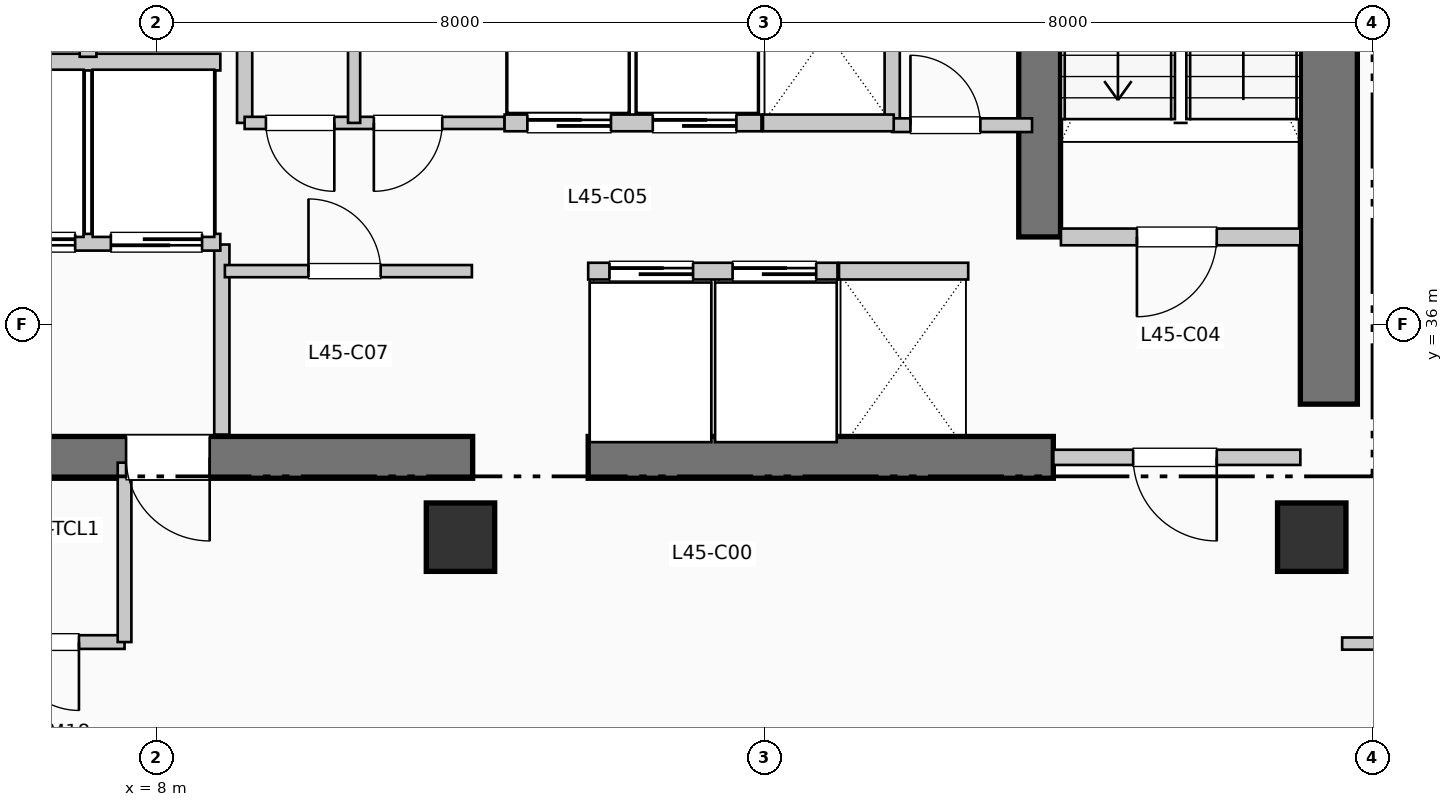
"""IFC4 building model, lengths in metres.
Left out: names, types, materials, properties, quantities, classifications, styles, units other than length and angle.
Written with IfcOpenShell. Run it as: python <this file> out.ifc"""

import sys

from ifc_helpers import new_model, si_unit, direction, frame, frame_2d, origin, origin_2d, place, context, subcontext, project, spatial, rectangle, extrude, element, fill, save


model = new_model("IFC4")
c1 = context("Model", 3, precision=1e-05, world=origin(), true_north=direction((0.0, 1.0)))
c2 = subcontext(c1, "Body", "Model", "MODEL_VIEW")
j1 = project(units=[si_unit("LENGTHUNIT", "METRE"), si_unit("PLANEANGLEUNIT", "RADIAN")], contexts=[c1])
p1 = place(None, origin())
s1 = spatial("IfcSite", under=j1, at=p1, CompositionType="ELEMENT")
p2 = place(p1, origin())
s2 = spatial("IfcBuilding", under=s1, at=p2, CompositionType="ELEMENT")
p3 = place(p2, frame((0.0, 0.0, 187.44)))
s3 = spatial("IfcBuildingStorey", under=s2, at=p3, CompositionType="ELEMENT", Elevation=187.44)
p4 = place(p3, frame((23.425, 34.95, 0.0), z_axis=(0.0, 0.0, 1.0), x_axis=(0.0, 1.0, 0.0)))
e1 = element("IfcWall", 1, at=p4, inside=s3, PredefinedType="SHEAR", context=c2, shape_type="SweptSolid", body=[
    extrude(rectangle(XDim=10.64, YDim=0.75, at=frame_2d((5.32, 0.0))), origin(), (0.0, 0.0, 1.0), 3.96),
])
p5 = place(p3, frame((1.45, 34.25, 0.0), z_axis=(0.0, 0.0, 1.0), x_axis=(1.0, 0.0, 0.0)))
e2 = element("IfcWall", 2, at=p5, inside=s3, PredefinedType="SHEAR", context=c2, shape_type="SweptSolid", body=[
    extrude(rectangle(XDim=10.71, YDim=0.55, at=frame_2d((5.355, 0.0))), origin(), (0.0, 0.0, 1.0), 3.96),
])
p6 = place(p5, frame((7.25, 0.0, 0.0), z_axis=(0.0, 0.0, 1.0), x_axis=(-1.0, 0.0, 0.0)))
e3 = element("IfcOpeningElement", 3, at=p6, cuts=e2, PredefinedType="OPENING", context=c2, shape_type="SweptSolid", body=[
    extrude(rectangle(XDim=1.1, YDim=2.15, at=frame_2d((0.55, 1.075))), frame((0.0, 0.285, 0.0), z_axis=(0.0, -1.0, 0.0), x_axis=(1.0, 0.0, 0.0)), (0.0, 0.0, 1.0), 0.57),
])
p7 = place(p3, frame((13.68, 34.25, 0.0), z_axis=(0.0, 0.0, 1.0), x_axis=(1.0, 0.0, 0.0)))
e4 = element("IfcWall", 4, at=p7, inside=s3, PredefinedType="SHEAR", context=c2, shape_type="SweptSolid", body=[
    extrude(rectangle(XDim=6.12, YDim=0.55, at=frame_2d((3.06, 0.0))), origin(), (0.0, 0.0, 1.0), 3.96),
])
p8 = place(p3, frame((19.62, 37.15, 0.0), z_axis=(0.0, 0.0, 1.0), x_axis=(0.0, 1.0, 0.0)))
e5 = element("IfcWall", 5, at=p8, inside=s3, PredefinedType="SHEAR", context=c2, shape_type="SweptSolid", body=[
    extrude(rectangle(XDim=7.89, YDim=0.55, at=frame_2d((3.945, 0.0))), origin(), (0.0, 0.0, 1.0), 3.96),
])
for number, where, z_axis, x_axis in (
    (6, (12.0, 33.2, 0.0), (0.0, 0.0, 1.0), (1.0, 0.0, 0.0)),
    (7, (23.2, 33.2, 0.0), (0.0, 0.0, 1.0), (1.0, 0.0, 0.0)),
):
    element("IfcColumn", number, at=place(p3, frame(where, z_axis=z_axis, x_axis=x_axis)), inside=s3, PredefinedType="COLUMN", context=c2, shape_type="SweptSolid", body=[
        extrude(rectangle(XDim=0.9, YDim=0.9, at=origin_2d()), origin(), (0.0, 0.0, 1.0), 3.96),
    ])
p9 = place(p3, frame((8.86, 34.55, 0.0), z_axis=(0.0, 0.0, 1.0), x_axis=(0.0, 1.0, 0.0)))
e8 = element("IfcWall", 8, at=p9, inside=s3, PredefinedType="PARTITIONING", context=c2, shape_type="SweptSolid", body=[
    extrude(rectangle(XDim=2.5, YDim=0.2, at=frame_2d((1.25, 0.0))), origin(), (0.0, 0.0, 1.0), 3.71),
])
p10 = place(p3, frame((19.9, 37.15, 0.0), z_axis=(0.0, 0.0, 1.0), x_axis=(1.0, 0.0, 0.0)))
e9 = element("IfcWall", 9, at=p10, inside=s3, PredefinedType="PARTITIONING", context=c2, shape_type="SweptSolid", body=[
    extrude(rectangle(XDim=3.15, YDim=0.22, at=frame_2d((1.575, 0.0))), origin(), (0.0, 0.0, 1.0), 3.71),
])
p11 = place(p10, frame((2.05, 0.0, 0.0), z_axis=(0.0, 0.0, 1.0), x_axis=(-1.0, 0.0, 0.0)))
e10 = element("IfcOpeningElement", 10, at=p11, cuts=e9, PredefinedType="OPENING", context=c2, shape_type="SweptSolid", body=[
    extrude(rectangle(XDim=1.05, YDim=2.15, at=frame_2d((0.525, 1.075))), frame((0.0, 0.12, 0.0), z_axis=(0.0, -1.0, 0.0), x_axis=(1.0, 0.0, 0.0)), (0.0, 0.0, 1.0), 0.24),
])
p12 = place(p3, frame((19.8, 34.25, 0.0), z_axis=(0.0, 0.0, 1.0), x_axis=(1.0, 0.0, 0.0)))
e11 = element("IfcWall", 11, at=p12, inside=s3, PredefinedType="PARTITIONING", context=c2, shape_type="SweptSolid", body=[
    extrude(rectangle(XDim=3.25, YDim=0.2, at=frame_2d((1.625, 0.0))), origin(), (0.0, 0.0, 1.0), 3.71),
])
p13 = place(p12, frame((2.15, 0.0, 0.0), z_axis=(0.0, 0.0, 1.0), x_axis=(-1.0, 0.0, 0.0)))
e12 = element("IfcOpeningElement", 12, at=p13, cuts=e11, PredefinedType="OPENING", context=c2, shape_type="SweptSolid", body=[
    extrude(rectangle(XDim=1.1, YDim=2.15, at=frame_2d((0.55, 1.075))), frame((0.0, 0.11, 0.0), z_axis=(0.0, -1.0, 0.0), x_axis=(1.0, 0.0, 0.0)), (0.0, 0.0, 1.0), 0.22),
])
p14 = place(p3, frame((5.38, 37.08, 0.0), z_axis=(0.0, 0.0, 1.0), x_axis=(1.0, 0.0, 0.0)))
e13 = element("IfcWall", 13, at=p14, inside=s3, PredefinedType="PARTITIONING", context=c2, shape_type="SweptSolid", body=[
    extrude(rectangle(XDim=3.46, YDim=0.22, at=frame_2d((1.73, 0.0))), origin(), (0.0, 0.0, 1.0), 3.71),
])
p15 = place(p14, frame((1.55, 0.0, 0.0), z_axis=(0.0, 0.0, 1.0), x_axis=(-1.0, 0.0, 0.0)))
e14 = element("IfcOpeningElement", 14, at=p15, cuts=e13, PredefinedType="OPENING", context=c2, shape_type="SweptSolid", body=[
    extrude(rectangle(XDim=1.2, YDim=2.2, at=frame_2d((0.6, 1.1))), frame((0.0, 0.12, 0.0), z_axis=(0.0, -1.0, 0.0), x_axis=(1.0, 0.0, 0.0)), (0.0, 0.0, 1.0), 0.24),
])
p16 = place(p14, frame((3.22, 0.0, 0.0), z_axis=(0.0, 0.0, 1.0), x_axis=(-1.0, 0.0, 0.0)))
e15 = element("IfcOpeningElement", 15, at=p16, cuts=e13, PredefinedType="OPENING", context=c2, shape_type="SweptSolid", body=[
    extrude(rectangle(XDim=1.2, YDim=2.2, at=frame_2d((0.6, 1.1))), frame((0.0, 0.12, 0.0), z_axis=(0.0, -1.0, 0.0), x_axis=(1.0, 0.0, 0.0)), (0.0, 0.0, 1.0), 0.24),
])
p17 = place(p3, frame((5.38, 39.45, 0.0), z_axis=(0.0, 0.0, 1.0), x_axis=(1.0, 0.0, 0.0)))
e16 = element("IfcWall", 16, at=p17, inside=s3, PredefinedType="PARTITIONING", context=c2, shape_type="SweptSolid", body=[
    extrude(rectangle(XDim=3.46, YDim=0.22, at=frame_2d((1.73, 0.0))), origin(), (0.0, 0.0, 1.0), 3.71),
])
p18 = place(p3, frame((7.1, 39.52, 0.0), z_axis=(0.0, 0.0, 1.0), x_axis=(0.0, 1.0, 0.0)))
e17 = element("IfcWall", 17, at=p18, inside=s3, PredefinedType="PARTITIONING", context=c2, shape_type="SweptSolid", body=[
    extrude(rectangle(XDim=2.93, YDim=0.22, at=frame_2d((1.465, 0.0))), origin(), (0.0, 0.0, 1.0), 3.71),
])
for number, where, z_axis, x_axis in (
    (18, (9.16, 38.65, 0.0), (0.0, 0.0, 1.0), (0.0, 1.0, 0.0)),
    (19, (17.68, 38.65, 0.0), (0.0, 0.0, 1.0), (0.0, 1.0, 0.0)),
):
    element("IfcWall", number, at=place(p3, frame(where, z_axis=z_axis, x_axis=x_axis)), inside=s3, PredefinedType="PARTITIONING", context=c2, shape_type="SweptSolid", body=[
        extrude(rectangle(XDim=2.35, YDim=0.2, at=frame_2d((1.175, 0.0))), origin(), (0.0, 0.0, 1.0), 3.71),
    ])
p19 = place(p3, frame((17.68, 38.62, 0.0), z_axis=(0.0, 0.0, 1.0), x_axis=(1.0, 0.0, 0.0)))
e20 = element("IfcWall", 20, at=p19, inside=s3, PredefinedType="PARTITIONING", context=c2, shape_type="SweptSolid", body=[
    extrude(rectangle(XDim=1.84, YDim=0.18, at=frame_2d((0.92, 0.0))), origin(), (0.0, 0.0, 1.0), 3.71),
])
p20 = place(p19, frame((0.24, 0.0, 0.0)))
e21 = element("IfcOpeningElement", 21, at=p20, cuts=e20, PredefinedType="OPENING", context=c2, shape_type="SweptSolid", body=[
    extrude(rectangle(XDim=0.92, YDim=2.1, at=frame_2d((0.46, 1.05))), frame((0.0, 0.1, 0.0), z_axis=(0.0, -1.0, 0.0), x_axis=(1.0, 0.0, 0.0)), (0.0, 0.0, 1.0), 0.2),
])
p21 = place(p3, frame((5.5, 31.82, 0.0), z_axis=(0.0, 0.0, 1.0), x_axis=(1.0, 0.0, 0.0)))
e22 = element("IfcWall", 22, at=p21, inside=s3, PredefinedType="PLUMBINGWALL", context=c2, shape_type="SweptSolid", body=[
    extrude(rectangle(XDim=2.08, YDim=0.18, at=frame_2d((1.04, 0.0))), origin(), (0.0, 0.0, 1.0), 3.71),
])
p22 = place(p21, frame((1.48, 0.0, 0.0), z_axis=(0.0, 0.0, 1.0), x_axis=(-1.0, 0.0, 0.0)))
e23 = element("IfcOpeningElement", 23, at=p22, cuts=e22, PredefinedType="OPENING", context=c2, shape_type="SweptSolid", body=[
    extrude(rectangle(XDim=0.9, YDim=2.1, at=frame_2d((0.45, 1.05))), frame((0.0, 0.1, 0.0), z_axis=(0.0, -1.0, 0.0), x_axis=(1.0, 0.0, 0.0)), (0.0, 0.0, 1.0), 0.2),
])
p23 = place(p3, frame((7.58, 31.82, 0.0), z_axis=(0.0, 0.0, 1.0), x_axis=(0.0, 1.0, 0.0)))
e24 = element("IfcWall", 24, at=p23, inside=s3, PredefinedType="PLUMBINGWALL", context=c2, shape_type="SweptSolid", body=[
    extrude(rectangle(XDim=2.36, YDim=0.18, at=frame_2d((1.18, 0.0))), origin(), (0.0, 0.0, 1.0), 3.71),
])
p24 = place(p3, frame((8.9, 36.7, 0.0), z_axis=(0.0, 0.0, 1.0), x_axis=(1.0, 0.0, 0.0)))
e25 = element("IfcWall", 25, at=p24, inside=s3, PredefinedType="PARTITIONING", context=c2, shape_type="SweptSolid", body=[
    extrude(rectangle(XDim=3.25, YDim=0.16, at=frame_2d((1.625, 0.0))), origin(), (0.0, 0.0, 1.0), 3.71),
])
p25 = place(p24, frame((1.1, 0.0, 0.0)))
e26 = element("IfcOpeningElement", 26, at=p25, cuts=e25, PredefinedType="OPENING", context=c2, shape_type="SweptSolid", body=[
    extrude(rectangle(XDim=0.95, YDim=2.15, at=frame_2d((0.475, 1.075))), frame((0.0, 0.09, 0.0), z_axis=(0.0, -1.0, 0.0), x_axis=(1.0, 0.0, 0.0)), (0.0, 0.0, 1.0), 0.18),
])
p26 = place(p3, frame((9.16, 38.65, 0.0), z_axis=(0.0, 0.0, 1.0), x_axis=(1.0, 0.0, 0.0)))
e27 = element("IfcWall", 27, at=p26, inside=s3, PredefinedType="PARTITIONING", context=c2, shape_type="SweptSolid", body=[
    extrude(rectangle(XDim=3.42, YDim=0.16, at=frame_2d((1.71, 0.0))), origin(), (0.0, 0.0, 1.0), 3.71),
])
p27 = place(p26, frame((1.18, 0.0, 0.0), z_axis=(0.0, 0.0, 1.0), x_axis=(-1.0, 0.0, 0.0)))
e28 = element("IfcOpeningElement", 28, at=p27, cuts=e27, PredefinedType="OPENING", context=c2, shape_type="SweptSolid", body=[
    extrude(rectangle(XDim=0.9, YDim=2.15, at=frame_2d((0.45, 1.075))), frame((0.0, 0.09, 0.0), z_axis=(0.0, -1.0, 0.0), x_axis=(1.0, 0.0, 0.0)), (0.0, 0.0, 1.0), 0.18),
])
p28 = place(p26, frame((2.6, 0.0, 0.0), z_axis=(0.0, 0.0, 1.0), x_axis=(-1.0, 0.0, 0.0)))
e29 = element("IfcOpeningElement", 29, at=p28, cuts=e27, PredefinedType="OPENING", context=c2, shape_type="SweptSolid", body=[
    extrude(rectangle(XDim=0.9, YDim=2.15, at=frame_2d((0.45, 1.075))), frame((0.0, 0.09, 0.0), z_axis=(0.0, -1.0, 0.0), x_axis=(1.0, 0.0, 0.0)), (0.0, 0.0, 1.0), 0.18),
])
p29 = place(p3, frame((10.6, 38.65, 0.0), z_axis=(0.0, 0.0, 1.0), x_axis=(0.0, 1.0, 0.0)))
e30 = element("IfcWall", 30, at=p29, inside=s3, PredefinedType="PARTITIONING", context=c2, shape_type="SweptSolid", body=[
    extrude(rectangle(XDim=2.35, YDim=0.16, at=frame_2d((1.175, 0.0))), origin(), (0.0, 0.0, 1.0), 3.71),
])
p30 = place(p3, frame((13.68, 36.7, 0.0), z_axis=(0.0, 0.0, 1.0), x_axis=(1.0, 0.0, 0.0)))
e31 = element("IfcWall", 31, at=p30, inside=s3, PredefinedType="PARTITIONING", context=c2, shape_type="SweptSolid", body=[
    extrude(rectangle(XDim=3.28, YDim=0.22, at=frame_2d((1.64, 0.0))), origin(), (0.0, 0.0, 1.0), 3.71),
])
p31 = place(p30, frame((0.28, 0.0, 0.0)))
e32 = element("IfcOpeningElement", 32, at=p31, cuts=e31, PredefinedType="OPENING", context=c2, shape_type="SweptSolid", body=[
    extrude(rectangle(XDim=1.1, YDim=2.2, at=frame_2d((0.55, 1.1))), frame((0.0, 0.12, 0.0), z_axis=(0.0, -1.0, 0.0), x_axis=(1.0, 0.0, 0.0)), (0.0, 0.0, 1.0), 0.24),
])
p32 = place(p30, frame((1.9, 0.0, 0.0)))
e33 = element("IfcOpeningElement", 33, at=p32, cuts=e31, PredefinedType="OPENING", context=c2, shape_type="SweptSolid", body=[
    extrude(rectangle(XDim=1.1, YDim=2.2, at=frame_2d((0.55, 1.1))), frame((0.0, 0.12, 0.0), z_axis=(0.0, -1.0, 0.0), x_axis=(1.0, 0.0, 0.0)), (0.0, 0.0, 1.0), 0.24),
])
p33 = place(p3, frame((12.58, 38.65, 0.0), z_axis=(0.0, 0.0, 1.0), x_axis=(1.0, 0.0, 0.0)))
e34 = element("IfcWall", 34, at=p33, inside=s3, PredefinedType="PARTITIONING", context=c2, shape_type="SweptSolid", body=[
    extrude(rectangle(XDim=3.38, YDim=0.22, at=frame_2d((1.69, 0.0))), origin(), (0.0, 0.0, 1.0), 3.71),
])
p34 = place(p33, frame((0.3, 0.0, 0.0)))
e35 = element("IfcOpeningElement", 35, at=p34, cuts=e34, PredefinedType="OPENING", context=c2, shape_type="SweptSolid", body=[
    extrude(rectangle(XDim=1.1, YDim=2.2, at=frame_2d((0.55, 1.1))), frame((0.0, 0.12, 0.0), z_axis=(0.0, -1.0, 0.0), x_axis=(1.0, 0.0, 0.0)), (0.0, 0.0, 1.0), 0.24),
])
p35 = place(p33, frame((1.95, 0.0, 0.0)))
e36 = element("IfcOpeningElement", 36, at=p35, cuts=e34, PredefinedType="OPENING", context=c2, shape_type="SweptSolid", body=[
    extrude(rectangle(XDim=1.1, YDim=2.2, at=frame_2d((0.55, 1.1))), frame((0.0, 0.12, 0.0), z_axis=(0.0, -1.0, 0.0), x_axis=(1.0, 0.0, 0.0)), (0.0, 0.0, 1.0), 0.24),
])
p36 = place(p3, frame((16.98, 36.7, 0.0), z_axis=(0.0, 0.0, 1.0), x_axis=(1.0, 0.0, 0.0)))
e37 = element("IfcWall", 37, at=p36, inside=s3, PredefinedType="PARTITIONING", context=c2, shape_type="SweptSolid", body=[
    extrude(rectangle(XDim=1.7, YDim=0.22, at=frame_2d((0.85, 0.0))), origin(), (0.0, 0.0, 1.0), 3.71),
])
p37 = place(p3, frame((15.98, 38.65, 0.0), z_axis=(0.0, 0.0, 1.0), x_axis=(1.0, 0.0, 0.0)))
e38 = element("IfcWall", 38, at=p37, inside=s3, PredefinedType="PARTITIONING", context=c2, shape_type="SweptSolid", body=[
    extrude(rectangle(XDim=1.72, YDim=0.22, at=frame_2d((0.86, 0.0))), origin(), (0.0, 0.0, 1.0), 3.71),
])
p38 = place(p3, frame((23.6, 31.8, 0.0), z_axis=(0.0, 0.0, 1.0), x_axis=(1.0, 0.0, 0.0)))
e39 = element("IfcWall", 39, at=p38, inside=s3, PredefinedType="PARTITIONING", context=c2, shape_type="SweptSolid", body=[
    extrude(rectangle(XDim=26.41, YDim=0.16, at=frame_2d((13.205, 0.0))), origin(), (0.0, 0.0, 1.0), 3.71),
])
p39 = place(p38, frame((2.166, 0.0, 0.0)))
e40 = element("IfcOpeningElement", 40, at=p39, cuts=e39, PredefinedType="OPENING", context=c2, shape_type="SweptSolid", body=[
    extrude(rectangle(XDim=0.95, YDim=2.15, at=frame_2d((0.475, 1.075))), frame((0.0, 0.09, 0.0), z_axis=(0.0, -1.0, 0.0), x_axis=(1.0, 0.0, 0.0)), (0.0, 0.0, 1.0), 0.18),
])
p40 = place(p38, frame((7.948, 0.0, 0.0)))
e41 = element("IfcOpeningElement", 41, at=p40, cuts=e39, PredefinedType="OPENING", context=c2, shape_type="SweptSolid", body=[
    extrude(rectangle(XDim=0.95, YDim=2.15, at=frame_2d((0.475, 1.075))), frame((0.0, 0.09, 0.0), z_axis=(0.0, -1.0, 0.0), x_axis=(1.0, 0.0, 0.0)), (0.0, 0.0, 1.0), 0.18),
])
p41 = place(p38, frame((12.73, 0.0, 0.0)))
e42 = element("IfcOpeningElement", 42, at=p41, cuts=e39, PredefinedType="OPENING", context=c2, shape_type="SweptSolid", body=[
    extrude(rectangle(XDim=0.95, YDim=2.15, at=frame_2d((0.475, 1.075))), frame((0.0, 0.09, 0.0), z_axis=(0.0, -1.0, 0.0), x_axis=(1.0, 0.0, 0.0)), (0.0, 0.0, 1.0), 0.18),
])
p42 = place(p38, frame((18.012, 0.0, 0.0)))
e43 = element("IfcOpeningElement", 43, at=p42, cuts=e39, PredefinedType="OPENING", context=c2, shape_type="SweptSolid", body=[
    extrude(rectangle(XDim=0.95, YDim=2.15, at=frame_2d((0.475, 1.075))), frame((0.0, 0.09, 0.0), z_axis=(0.0, -1.0, 0.0), x_axis=(1.0, 0.0, 0.0)), (0.0, 0.0, 1.0), 0.18),
])
p43 = place(p38, frame((23.294, 0.0, 0.0)))
e44 = element("IfcOpeningElement", 44, at=p43, cuts=e39, PredefinedType="OPENING", context=c2, shape_type="SweptSolid", body=[
    extrude(rectangle(XDim=0.95, YDim=2.15, at=frame_2d((0.475, 1.075))), frame((0.0, 0.09, 0.0), z_axis=(0.0, -1.0, 0.0), x_axis=(1.0, 0.0, 0.0)), (0.0, 0.0, 1.0), 0.18),
])
p44 = place(p6, origin())
e45 = element("IfcDoor", 45, at=p44, inside=s3, OperationType="SINGLE_SWING_RIGHT", PredefinedType="DOOR", context=c2, shape_type="SweptSolid", body=[
    extrude(rectangle(XDim=1.1, YDim=2.15, at=frame_2d((0.55, 1.075))), frame((0.0, 0.025, 0.0), z_axis=(0.0, -1.0, 0.0), x_axis=(1.0, 0.0, 0.0)), (0.0, 0.0, 1.0), 0.05),
])
fill(e3, e45)
p45 = place(p11, origin())
e46 = element("IfcDoor", 46, at=p45, inside=s3, OperationType="SINGLE_SWING_LEFT", PredefinedType="DOOR", context=c2, shape_type="SweptSolid", body=[
    extrude(rectangle(XDim=1.05, YDim=2.15, at=frame_2d((0.525, 1.075))), frame((0.0, 0.025, 0.0), z_axis=(0.0, -1.0, 0.0), x_axis=(1.0, 0.0, 0.0)), (0.0, 0.0, 1.0), 0.05),
])
fill(e10, e46)
p46 = place(p13, origin())
e47 = element("IfcDoor", 47, at=p46, inside=s3, OperationType="SINGLE_SWING_RIGHT", PredefinedType="DOOR", context=c2, shape_type="SweptSolid", body=[
    extrude(rectangle(XDim=1.1, YDim=2.15, at=frame_2d((0.55, 1.075))), frame((0.0, 0.025, 0.0), z_axis=(0.0, -1.0, 0.0), x_axis=(1.0, 0.0, 0.0)), (0.0, 0.0, 1.0), 0.05),
])
fill(e12, e47)
p47 = place(p15, origin())
e48 = element("IfcDoor", 48, at=p47, inside=s3, OperationType="SLIDING_TO_RIGHT", PredefinedType="DOOR", context=c2, shape_type="SweptSolid", body=[
    extrude(rectangle(XDim=1.2, YDim=2.2, at=frame_2d((0.6, 1.1))), frame((0.0, 0.025, 0.0), z_axis=(0.0, -1.0, 0.0), x_axis=(1.0, 0.0, 0.0)), (0.0, 0.0, 1.0), 0.05),
])
fill(e14, e48)
p48 = place(p16, origin())
e49 = element("IfcDoor", 49, at=p48, inside=s3, OperationType="SLIDING_TO_RIGHT", PredefinedType="DOOR", context=c2, shape_type="SweptSolid", body=[
    extrude(rectangle(XDim=1.2, YDim=2.2, at=frame_2d((0.6, 1.1))), frame((0.0, 0.025, 0.0), z_axis=(0.0, -1.0, 0.0), x_axis=(1.0, 0.0, 0.0)), (0.0, 0.0, 1.0), 0.05),
])
fill(e15, e49)
p49 = place(p20, origin())
e50 = element("IfcDoor", 50, at=p49, inside=s3, OperationType="SINGLE_SWING_LEFT", PredefinedType="DOOR", context=c2, shape_type="SweptSolid", body=[
    extrude(rectangle(XDim=0.92, YDim=2.1, at=frame_2d((0.46, 1.05))), frame((0.0, 0.025, 0.0), z_axis=(0.0, -1.0, 0.0), x_axis=(1.0, 0.0, 0.0)), (0.0, 0.0, 1.0), 0.05),
])
fill(e21, e50)
p50 = place(p22, origin())
e51 = element("IfcDoor", 51, at=p50, inside=s3, OperationType="SINGLE_SWING_RIGHT", PredefinedType="DOOR", context=c2, shape_type="SweptSolid", body=[
    extrude(rectangle(XDim=0.9, YDim=2.1, at=frame_2d((0.45, 1.05))), frame((0.0, 0.025, 0.0), z_axis=(0.0, -1.0, 0.0), x_axis=(1.0, 0.0, 0.0)), (0.0, 0.0, 1.0), 0.05),
])
fill(e23, e51)
p51 = place(p25, origin())
e52 = element("IfcDoor", 52, at=p51, inside=s3, OperationType="SINGLE_SWING_LEFT", PredefinedType="DOOR", context=c2, shape_type="SweptSolid", body=[
    extrude(rectangle(XDim=0.95, YDim=2.15, at=frame_2d((0.475, 1.075))), frame((0.0, 0.025, 0.0), z_axis=(0.0, -1.0, 0.0), x_axis=(1.0, 0.0, 0.0)), (0.0, 0.0, 1.0), 0.05),
])
fill(e26, e52)
p52 = place(p27, origin())
e53 = element("IfcDoor", 53, at=p52, inside=s3, OperationType="SINGLE_SWING_RIGHT", PredefinedType="DOOR", context=c2, shape_type="SweptSolid", body=[
    extrude(rectangle(XDim=0.9, YDim=2.15, at=frame_2d((0.45, 1.075))), frame((0.0, 0.025, 0.0), z_axis=(0.0, -1.0, 0.0), x_axis=(1.0, 0.0, 0.0)), (0.0, 0.0, 1.0), 0.05),
])
fill(e28, e53)
p53 = place(p28, origin())
e54 = element("IfcDoor", 54, at=p53, inside=s3, OperationType="SINGLE_SWING_LEFT", PredefinedType="DOOR", context=c2, shape_type="SweptSolid", body=[
    extrude(rectangle(XDim=0.9, YDim=2.15, at=frame_2d((0.45, 1.075))), frame((0.0, 0.025, 0.0), z_axis=(0.0, -1.0, 0.0), x_axis=(1.0, 0.0, 0.0)), (0.0, 0.0, 1.0), 0.05),
])
fill(e29, e54)
p54 = place(p31, origin())
e55 = element("IfcDoor", 55, at=p54, inside=s3, OperationType="SLIDING_TO_RIGHT", PredefinedType="DOOR", context=c2, shape_type="SweptSolid", body=[
    extrude(rectangle(XDim=1.1, YDim=2.2, at=frame_2d((0.55, 1.1))), frame((0.0, 0.025, 0.0), z_axis=(0.0, -1.0, 0.0), x_axis=(1.0, 0.0, 0.0)), (0.0, 0.0, 1.0), 0.05),
])
fill(e32, e55)
p55 = place(p32, origin())
e56 = element("IfcDoor", 56, at=p55, inside=s3, OperationType="SLIDING_TO_RIGHT", PredefinedType="DOOR", context=c2, shape_type="SweptSolid", body=[
    extrude(rectangle(XDim=1.1, YDim=2.2, at=frame_2d((0.55, 1.1))), frame((0.0, 0.025, 0.0), z_axis=(0.0, -1.0, 0.0), x_axis=(1.0, 0.0, 0.0)), (0.0, 0.0, 1.0), 0.05),
])
fill(e33, e56)
p56 = place(p34, origin())
e57 = element("IfcDoor", 57, at=p56, inside=s3, OperationType="SLIDING_TO_RIGHT", PredefinedType="DOOR", context=c2, shape_type="SweptSolid", body=[
    extrude(rectangle(XDim=1.1, YDim=2.2, at=frame_2d((0.55, 1.1))), frame((0.0, 0.025, 0.0), z_axis=(0.0, -1.0, 0.0), x_axis=(1.0, 0.0, 0.0)), (0.0, 0.0, 1.0), 0.05),
])
fill(e35, e57)
p57 = place(p35, origin())
e58 = element("IfcDoor", 58, at=p57, inside=s3, OperationType="SLIDING_TO_RIGHT", PredefinedType="DOOR", context=c2, shape_type="SweptSolid", body=[
    extrude(rectangle(XDim=1.1, YDim=2.2, at=frame_2d((0.55, 1.1))), frame((0.0, 0.025, 0.0), z_axis=(0.0, -1.0, 0.0), x_axis=(1.0, 0.0, 0.0)), (0.0, 0.0, 1.0), 0.05),
])
fill(e36, e58)
save(model, sys.argv[1])
